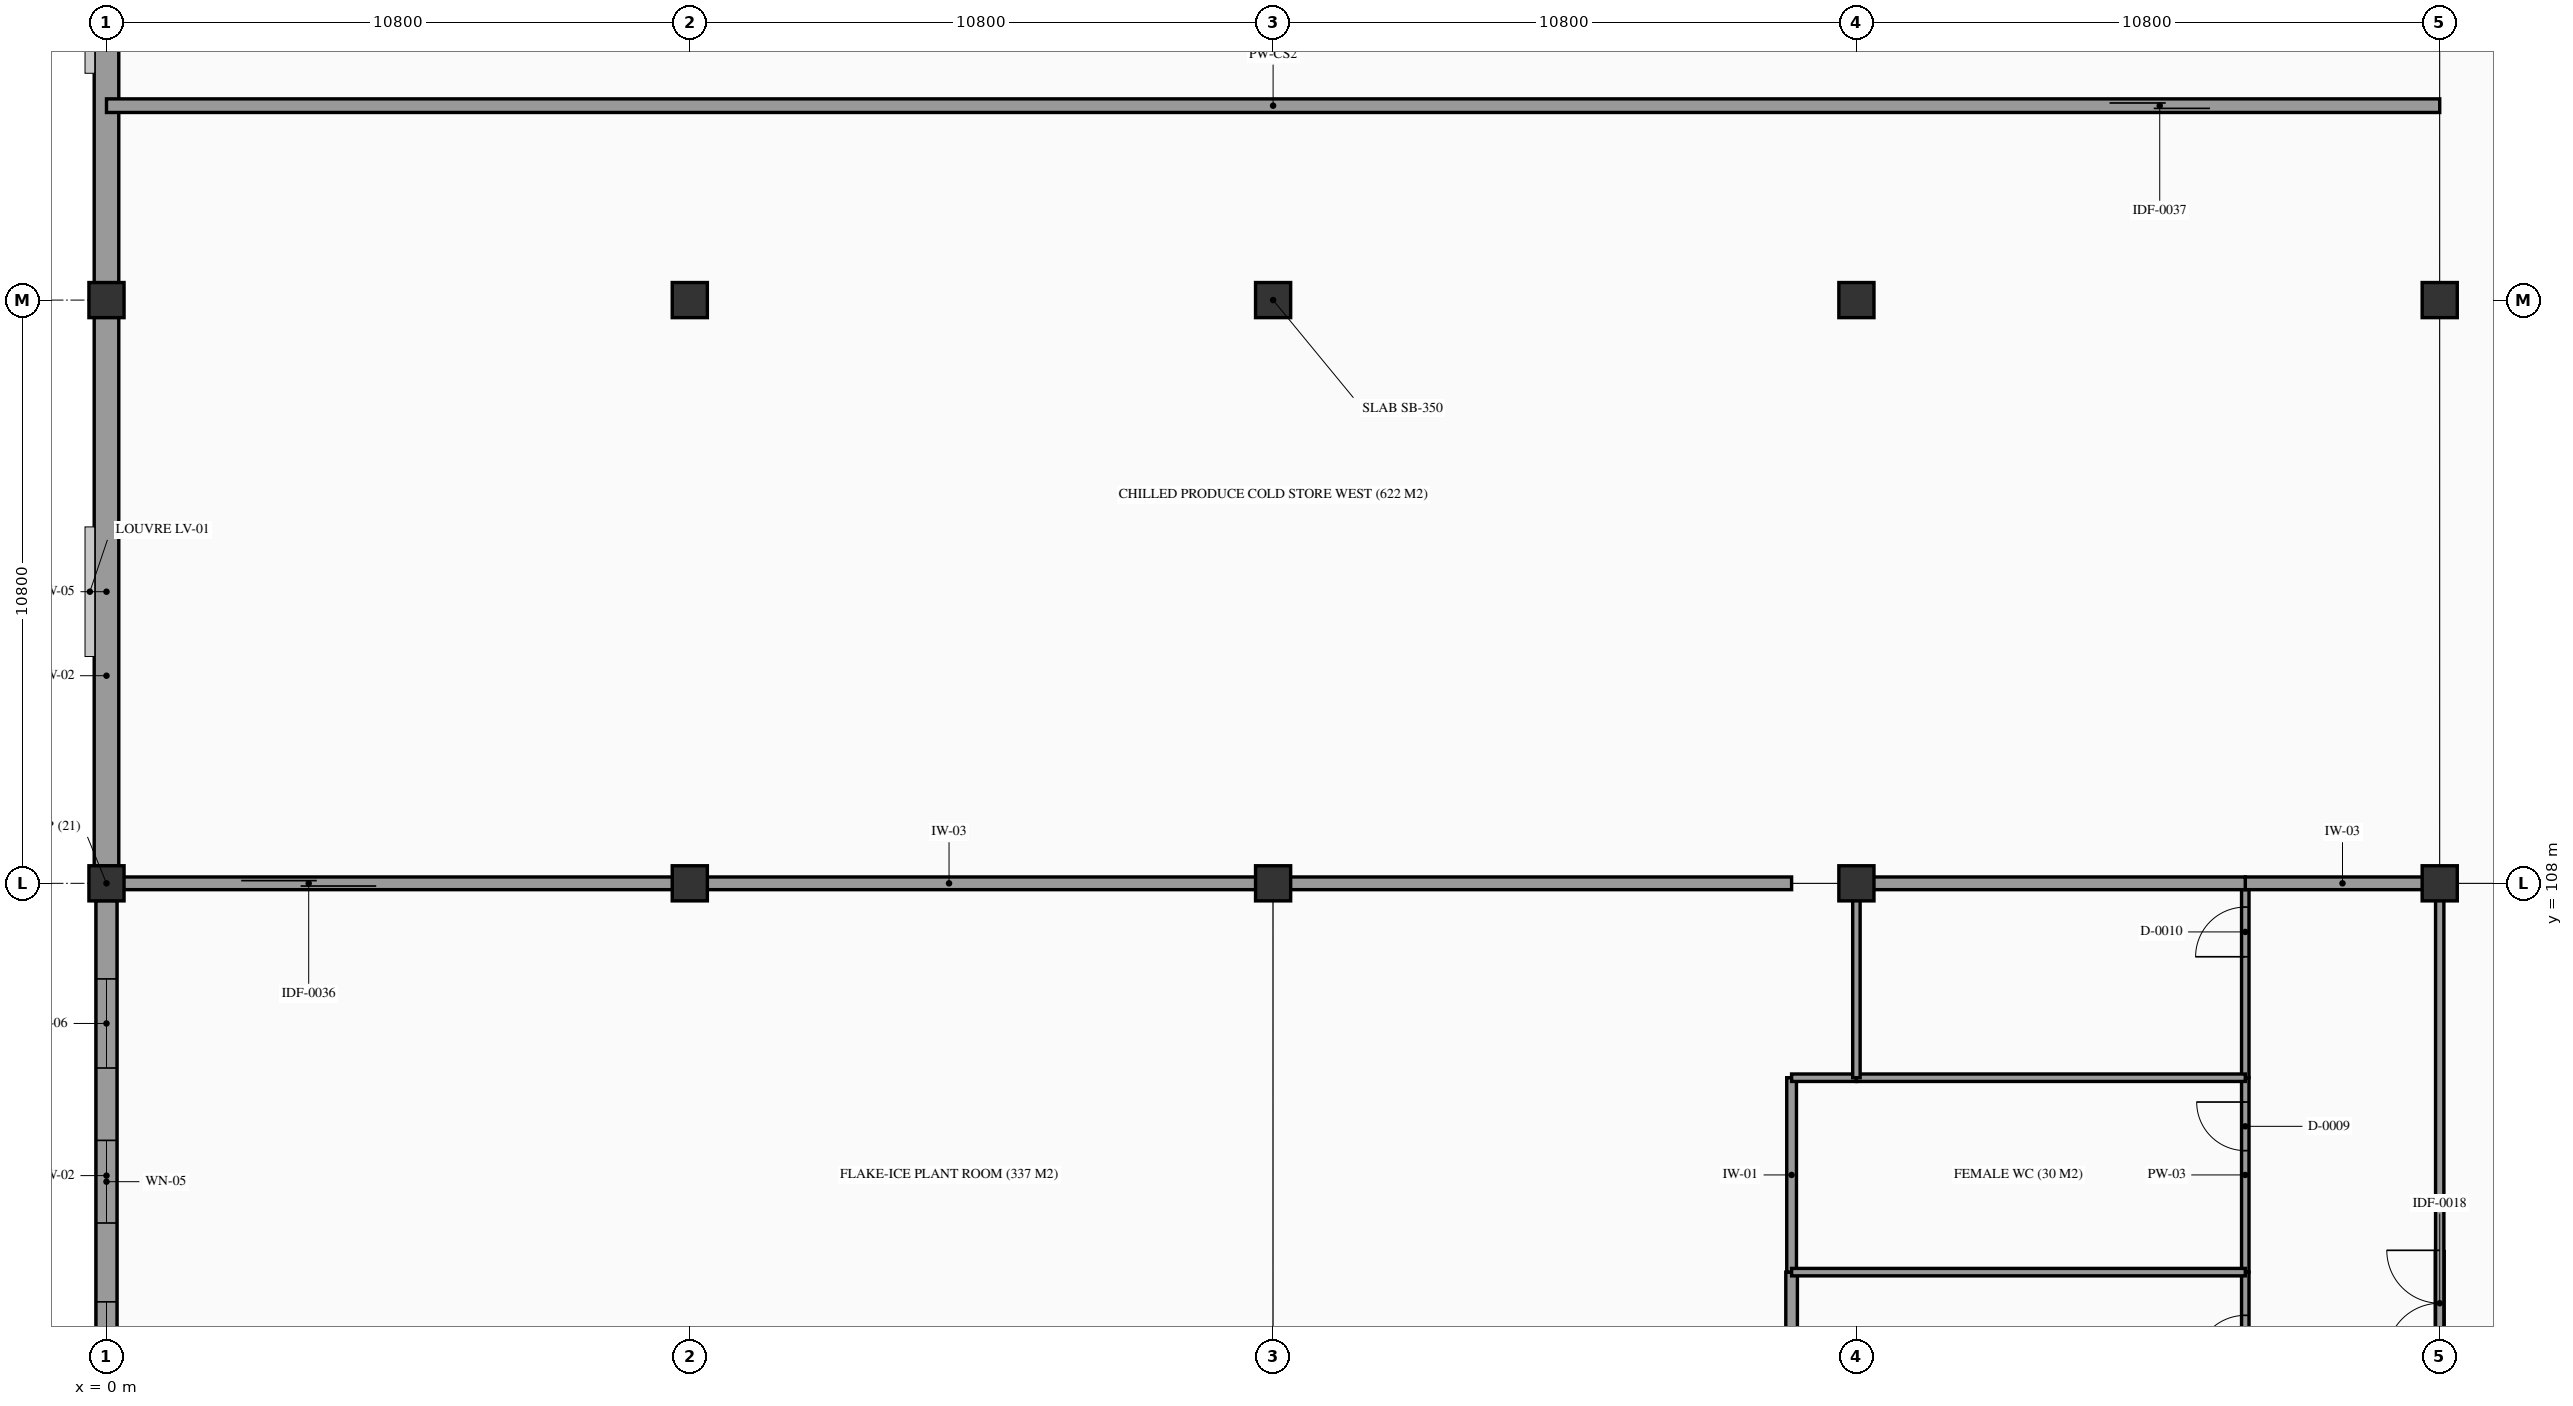
"""IFC4 building model, lengths in metres.
Left out: names, types, materials, properties, quantities, classifications, styles, units other than length and angle.
Written with IfcOpenShell. Run it as: python <this file> out.ifc"""

import sys

from ifc_helpers import new_model, si_unit, direction, frame, frame_2d, origin, origin_2d, place, context, subcontext, project, spatial, rectangle, extrude, element, fill, save


model = new_model("IFC4")
c1 = context("Model", 3, precision=1e-05, world=origin(), true_north=direction((0.0, 1.0)))
c2 = subcontext(c1, "Body", "Model", "MODEL_VIEW")
j1 = project(units=[si_unit("LENGTHUNIT", "METRE"), si_unit("PLANEANGLEUNIT", "RADIAN")], contexts=[c1])
p1 = place(None, origin())
s1 = spatial("IfcSite", under=j1, at=p1, CompositionType="ELEMENT")
p2 = place(p1, origin())
s2 = spatial("IfcBuilding", under=s1, at=p2, CompositionType="ELEMENT")
p3 = place(p2, origin())
s3 = spatial("IfcBuildingStorey", under=s2, at=p3, CompositionType="ELEMENT", Elevation=0.0)
for number, where, z_axis, x_axis in (
    (1, (0.0, 108.0, -1.2), (0.0, 0.0, 1.0), (1.0, 0.0, 0.0)),
    (2, (0.0, 118.8, -1.2), (0.0, 0.0, 1.0), (1.0, 0.0, 0.0)),
    (3, (10.8, 108.0, -1.2), (0.0, 0.0, 1.0), (1.0, 0.0, 0.0)),
    (4, (10.8, 118.8, -1.2), (0.0, 0.0, 1.0), (1.0, 0.0, 0.0)),
    (5, (21.6, 108.0, -1.2), (0.0, 0.0, 1.0), (1.0, 0.0, 0.0)),
    (6, (21.6, 118.8, -1.2), (0.0, 0.0, 1.0), (1.0, 0.0, 0.0)),
    (7, (32.4, 108.0, -1.2), (0.0, 0.0, 1.0), (1.0, 0.0, 0.0)),
    (8, (32.4, 118.8, -1.2), (0.0, 0.0, 1.0), (1.0, 0.0, 0.0)),
    (9, (43.2, 108.0, -1.2), (0.0, 0.0, 1.0), (1.0, 0.0, 0.0)),
    (10, (43.2, 118.8, -1.2), (0.0, 0.0, 1.0), (1.0, 0.0, 0.0)),
):
    element("IfcColumn", number, at=place(p3, frame(where, z_axis=z_axis, x_axis=x_axis)), inside=s3, PredefinedType="COLUMN", context=c2, shape_type="SweptSolid", body=[
        extrude(rectangle(XDim=0.65, YDim=0.65, at=origin_2d()), origin(), (0.0, 0.0, 1.0), 6.6),
    ])
p4 = place(p3, frame((0.0, 0.45, -1.2), z_axis=(0.0, 0.0, 1.0), x_axis=(0.0, 1.0, 0.0)))
e11 = element("IfcWall", 11, at=p4, inside=s3, PredefinedType="USERDEFINED", context=c2, shape_type="SweptSolid", body=[
    extrude(rectangle(XDim=128.7, YDim=0.374, at=frame_2d((64.35, 0.0))), origin(), (0.0, 0.0, 1.0), 0.14),
])
p5 = place(p3, frame((0.0, 97.495, 0.0), z_axis=(0.0, 0.0, 1.0), x_axis=(0.0, 1.0, 0.0)))
e12 = element("IfcWall", 12, at=p5, inside=s3, PredefinedType="STANDARD", context=c2, shape_type="SweptSolid", body=[
    extrude(rectangle(XDim=10.185, YDim=0.39, at=frame_2d((5.092, 0.0))), origin(), (0.0, 0.0, 1.0), 4.25),
])
p6 = place(p5, frame((1.345, 0.0, 0.95)))
e13 = element("IfcOpeningElement", 13, at=p6, cuts=e12, PredefinedType="OPENING", context=c2, shape_type="SweptSolid", body=[
    extrude(rectangle(XDim=1.41, YDim=0.9, at=frame_2d((0.705, 0.45))), frame((0.0, 0.205, 0.0), z_axis=(0.0, -1.0, 0.0), x_axis=(1.0, 0.0, 0.0)), (0.0, 0.0, 1.0), 0.41),
])
p7 = place(p5, frame((4.215, 0.0, 0.95)))
e14 = element("IfcOpeningElement", 14, at=p7, cuts=e12, PredefinedType="OPENING", context=c2, shape_type="SweptSolid", body=[
    extrude(rectangle(XDim=1.53, YDim=0.9, at=frame_2d((0.765, 0.45))), frame((0.0, 0.205, 0.0), z_axis=(0.0, -1.0, 0.0), x_axis=(1.0, 0.0, 0.0)), (0.0, 0.0, 1.0), 0.41),
])
p8 = place(p5, frame((7.085, 0.0, 0.95)))
e15 = element("IfcOpeningElement", 15, at=p8, cuts=e12, PredefinedType="OPENING", context=c2, shape_type="SweptSolid", body=[
    extrude(rectangle(XDim=1.65, YDim=0.9, at=frame_2d((0.825, 0.45))), frame((0.0, 0.205, 0.0), z_axis=(0.0, -1.0, 0.0), x_axis=(1.0, 0.0, 0.0)), (0.0, 0.0, 1.0), 0.41),
])
for number, where, z_axis, x_axis in (
    (16, (0.0, 108.32, 0.0), (0.0, 0.0, 1.0), (0.0, 1.0, 0.0)),
    (17, (0.0, 119.12, 0.0), (0.0, 0.0, 1.0), (0.0, 1.0, 0.0)),
):
    element("IfcWall", number, at=place(p3, frame(where, z_axis=z_axis, x_axis=x_axis)), inside=s3, PredefinedType="STANDARD", context=c2, shape_type="SweptSolid", body=[
        extrude(rectangle(XDim=10.16, YDim=0.455, at=frame_2d((5.08, 0.0))), origin(), (0.0, 0.0, 1.0), 4.25),
    ])
p9 = place(p3, frame((39.6, 97.2, 0.0), z_axis=(0.0, 0.0, 1.0), x_axis=(0.0, 1.0, 0.0)))
e18 = element("IfcWall", 18, at=p9, inside=s3, PredefinedType="PARTITIONING", context=c2, shape_type="SweptSolid", body=[
    extrude(rectangle(XDim=3.6, YDim=0.138, at=frame_2d((1.8, 0.0))), origin(), (0.0, 0.0, 1.0), 3.95),
])
p10 = place(p9, frame((1.88, 0.0, 0.0)))
e19 = element("IfcOpeningElement", 19, at=p10, cuts=e18, PredefinedType="OPENING", context=c2, shape_type="SweptSolid", body=[
    extrude(rectangle(XDim=0.92, YDim=2.14, at=frame_2d((0.46, 1.07))), frame((0.0, 0.079, 0.0), z_axis=(0.0, -1.0, 0.0), x_axis=(1.0, 0.0, 0.0)), (0.0, 0.0, 1.0), 0.158),
])
p11 = place(p3, frame((39.6, 100.8, 0.0), z_axis=(0.0, 0.0, 1.0), x_axis=(0.0, 1.0, 0.0)))
e20 = element("IfcWall", 20, at=p11, inside=s3, PredefinedType="PARTITIONING", context=c2, shape_type="SweptSolid", body=[
    extrude(rectangle(XDim=3.6, YDim=0.138, at=frame_2d((1.8, 0.0))), origin(), (0.0, 0.0, 1.0), 3.95),
])
p12 = place(p11, frame((2.25, 0.0, 0.0)))
e21 = element("IfcOpeningElement", 21, at=p12, cuts=e20, PredefinedType="OPENING", context=c2, shape_type="SweptSolid", body=[
    extrude(rectangle(XDim=0.9, YDim=2.1, at=frame_2d((0.45, 1.05))), frame((0.0, 0.079, 0.0), z_axis=(0.0, -1.0, 0.0), x_axis=(1.0, 0.0, 0.0)), (0.0, 0.0, 1.0), 0.158),
])
p13 = place(p3, frame((39.6, 104.4, 0.0), z_axis=(0.0, 0.0, 1.0), x_axis=(0.0, 1.0, 0.0)))
e22 = element("IfcWall", 22, at=p13, inside=s3, PredefinedType="PARTITIONING", context=c2, shape_type="SweptSolid", body=[
    extrude(rectangle(XDim=3.6, YDim=0.138, at=frame_2d((1.8, 0.0))), origin(), (0.0, 0.0, 1.0), 3.95),
])
p14 = place(p13, frame((2.24, 0.0, 0.0)))
e23 = element("IfcOpeningElement", 23, at=p14, cuts=e22, PredefinedType="OPENING", context=c2, shape_type="SweptSolid", body=[
    extrude(rectangle(XDim=0.92, YDim=2.14, at=frame_2d((0.46, 1.07))), frame((0.0, 0.079, 0.0), z_axis=(0.0, -1.0, 0.0), x_axis=(1.0, 0.0, 0.0)), (0.0, 0.0, 1.0), 0.158),
])
p15 = place(p3, frame((39.6, 108.0, 0.0), z_axis=(0.0, 0.0, 1.0), x_axis=(1.0, 0.0, 0.0)))
e24 = element("IfcWall", 24, at=p15, inside=s3, PredefinedType="PARTITIONING", context=c2, shape_type="SweptSolid", body=[
    extrude(rectangle(XDim=3.6, YDim=0.235, at=frame_2d((1.8, 0.0))), origin(), (0.0, 0.0, 1.0), 3.95),
])
p16 = place(p3, frame((43.2, 64.8, 0.0), z_axis=(0.0, 0.0, 1.0), x_axis=(0.0, 1.0, 0.0)))
e25 = element("IfcWall", 25, at=p16, inside=s3, PredefinedType="PARTITIONING", context=c2, shape_type="SweptSolid", body=[
    extrude(rectangle(XDim=43.2, YDim=0.154, at=frame_2d((21.6, 0.0))), origin(), (0.0, 0.0, 1.0), 3.95),
])
p17 = place(p16, frame((34.444, 0.0, 0.0)))
e26 = element("IfcOpeningElement", 26, at=p17, cuts=e25, PredefinedType="OPENING", context=c2, shape_type="SweptSolid", body=[
    extrude(rectangle(XDim=1.96, YDim=2.3, at=frame_2d((0.98, 1.15))), frame((0.0, 0.087, 0.0), z_axis=(0.0, -1.0, 0.0), x_axis=(1.0, 0.0, 0.0)), (0.0, 0.0, 1.0), 0.174),
])
p18 = place(p3, frame((0.0, 108.0, 0.0), z_axis=(0.0, 0.0, 1.0), x_axis=(1.0, 0.0, 0.0)))
e27 = element("IfcWall", 27, at=p18, inside=s3, PredefinedType="PARTITIONING", context=c2, shape_type="SweptSolid", body=[
    extrude(rectangle(XDim=31.2, YDim=0.235, at=frame_2d((15.6, 0.0))), origin(), (0.0, 0.0, 1.0), 3.95),
])
p19 = place(p18, frame((2.494, 0.0, 0.0)))
e28 = element("IfcOpeningElement", 28, at=p19, cuts=e27, PredefinedType="OPENING", context=c2, shape_type="SweptSolid", body=[
    extrude(rectangle(XDim=2.5, YDim=2.7, at=frame_2d((1.25, 1.35))), frame((0.0, 0.127, 0.0), z_axis=(0.0, -1.0, 0.0), x_axis=(1.0, 0.0, 0.0)), (0.0, 0.0, 1.0), 0.255),
])
p20 = place(p3, frame((0.0, 122.4, 0.0), z_axis=(0.0, 0.0, 1.0), x_axis=(1.0, 0.0, 0.0)))
e29 = element("IfcWall", 29, at=p20, inside=s3, PredefinedType="PARTITIONING", context=c2, shape_type="SweptSolid", body=[
    extrude(rectangle(XDim=43.2, YDim=0.252, at=frame_2d((21.6, 0.0))), origin(), (0.0, 0.0, 1.0), 3.95),
])
p21 = place(p20, frame((37.086, 0.0, 0.0)))
e30 = element("IfcOpeningElement", 30, at=p21, cuts=e29, PredefinedType="OPENING", context=c2, shape_type="SweptSolid", body=[
    extrude(rectangle(XDim=1.86, YDim=2.5, at=frame_2d((0.93, 1.25))), frame((0.0, 0.136, 0.0), z_axis=(0.0, -1.0, 0.0), x_axis=(1.0, 0.0, 0.0)), (0.0, 0.0, 1.0), 0.272),
])
p22 = place(p3, frame((31.2, 97.2, 0.0), z_axis=(0.0, 0.0, 1.0), x_axis=(0.0, 1.0, 0.0)))
e31 = element("IfcWall", 31, at=p22, inside=s3, PredefinedType="PARTITIONING", context=c2, shape_type="SweptSolid", body=[
    extrude(rectangle(XDim=3.6, YDim=0.215, at=frame_2d((1.8, 0.0))), origin(), (0.0, 0.0, 1.0), 3.95),
])
p23 = place(p3, frame((31.2, 100.8, 0.0), z_axis=(0.0, 0.0, 1.0), x_axis=(0.0, 1.0, 0.0)))
e32 = element("IfcWall", 32, at=p23, inside=s3, PredefinedType="PARTITIONING", context=c2, shape_type="SweptSolid", body=[
    extrude(rectangle(XDim=3.6, YDim=0.18, at=frame_2d((1.8, 0.0))), origin(), (0.0, 0.0, 1.0), 3.95),
])
p24 = place(p3, frame((31.2, 100.8, 0.0), z_axis=(0.0, 0.0, 1.0), x_axis=(1.0, 0.0, 0.0)))
e33 = element("IfcWall", 33, at=p24, inside=s3, PredefinedType="PARTITIONING", context=c2, shape_type="SweptSolid", body=[
    extrude(rectangle(XDim=8.4, YDim=0.138, at=frame_2d((4.2, 0.0))), origin(), (0.0, 0.0, 1.0), 3.95),
])
p25 = place(p3, frame((31.2, 104.4, 0.0), z_axis=(0.0, 0.0, 1.0), x_axis=(1.0, 0.0, 0.0)))
e34 = element("IfcWall", 34, at=p25, inside=s3, PredefinedType="PARTITIONING", context=c2, shape_type="SweptSolid", body=[
    extrude(rectangle(XDim=1.2, YDim=0.138, at=frame_2d((0.6, 0.0))), origin(), (0.0, 0.0, 1.0), 3.95),
])
p26 = place(p3, frame((32.4, 104.4, 0.0), z_axis=(0.0, 0.0, 1.0), x_axis=(1.0, 0.0, 0.0)))
e35 = element("IfcWall", 35, at=p26, inside=s3, PredefinedType="PARTITIONING", context=c2, shape_type="SweptSolid", body=[
    extrude(rectangle(XDim=7.2, YDim=0.138, at=frame_2d((3.6, 0.0))), origin(), (0.0, 0.0, 1.0), 3.95),
])
p27 = place(p3, frame((32.4, 104.4, 0.0), z_axis=(0.0, 0.0, 1.0), x_axis=(0.0, 1.0, 0.0)))
e36 = element("IfcWall", 36, at=p27, inside=s3, PredefinedType="PARTITIONING", context=c2, shape_type="SweptSolid", body=[
    extrude(rectangle(XDim=3.6, YDim=0.138, at=frame_2d((1.8, 0.0))), origin(), (0.0, 0.0, 1.0), 3.95),
])
p28 = place(p3, frame((32.4, 108.0, 0.0), z_axis=(0.0, 0.0, 1.0), x_axis=(1.0, 0.0, 0.0)))
e37 = element("IfcWall", 37, at=p28, inside=s3, PredefinedType="PARTITIONING", context=c2, shape_type="SweptSolid", body=[
    extrude(rectangle(XDim=7.2, YDim=0.235, at=frame_2d((3.6, 0.0))), origin(), (0.0, 0.0, 1.0), 3.95),
])
p29 = place(p6, origin())
e38 = element("IfcWindow", 38, at=p29, inside=s3, PartitioningType="SINGLE_PANEL", PredefinedType="WINDOW", context=c2, shape_type="SweptSolid", body=[
    extrude(rectangle(XDim=1.41, YDim=0.9, at=frame_2d((0.705, 0.45))), frame((0.0, 0.03, 0.0), z_axis=(0.0, -1.0, 0.0), x_axis=(1.0, 0.0, 0.0)), (0.0, 0.0, 1.0), 0.06),
])
fill(e13, e38)
p30 = place(p7, origin())
e39 = element("IfcWindow", 39, at=p30, inside=s3, PartitioningType="SINGLE_PANEL", PredefinedType="WINDOW", context=c2, shape_type="SweptSolid", body=[
    extrude(rectangle(XDim=1.53, YDim=0.9, at=frame_2d((0.765, 0.45))), frame((0.0, 0.03, 0.0), z_axis=(0.0, -1.0, 0.0), x_axis=(1.0, 0.0, 0.0)), (0.0, 0.0, 1.0), 0.06),
])
fill(e14, e39)
p31 = place(p8, origin())
e40 = element("IfcWindow", 40, at=p31, inside=s3, PartitioningType="SINGLE_PANEL", PredefinedType="WINDOW", context=c2, shape_type="SweptSolid", body=[
    extrude(rectangle(XDim=1.65, YDim=0.9, at=frame_2d((0.825, 0.45))), frame((0.0, 0.03, 0.0), z_axis=(0.0, -1.0, 0.0), x_axis=(1.0, 0.0, 0.0)), (0.0, 0.0, 1.0), 0.06),
])
fill(e15, e40)
p32 = place(p10, origin())
e41 = element("IfcDoor", 41, at=p32, inside=s3, OperationType="SINGLE_SWING_LEFT", PredefinedType="DOOR", context=c2, shape_type="SweptSolid", body=[
    extrude(rectangle(XDim=0.92, YDim=2.14, at=frame_2d((0.46, 1.07))), frame((0.0, 0.025, 0.0), z_axis=(0.0, -1.0, 0.0), x_axis=(1.0, 0.0, 0.0)), (0.0, 0.0, 1.0), 0.05),
])
fill(e19, e41)
p33 = place(p12, frame((0.9, 0.0, 0.0), z_axis=(0.0, 0.0, 1.0), x_axis=(-1.0, 0.0, 0.0)))
e42 = element("IfcDoor", 42, at=p33, inside=s3, OperationType="SINGLE_SWING_RIGHT", PredefinedType="DOOR", context=c2, shape_type="SweptSolid", body=[
    extrude(rectangle(XDim=0.9, YDim=2.1, at=frame_2d((0.45, 1.05))), frame((0.0, 0.025, 0.0), z_axis=(0.0, -1.0, 0.0), x_axis=(1.0, 0.0, 0.0)), (0.0, 0.0, 1.0), 0.05),
])
fill(e21, e42)
p34 = place(p14, origin())
e43 = element("IfcDoor", 43, at=p34, inside=s3, OperationType="SINGLE_SWING_LEFT", PredefinedType="DOOR", context=c2, shape_type="SweptSolid", body=[
    extrude(rectangle(XDim=0.92, YDim=2.14, at=frame_2d((0.46, 1.07))), frame((0.0, 0.025, 0.0), z_axis=(0.0, -1.0, 0.0), x_axis=(1.0, 0.0, 0.0)), (0.0, 0.0, 1.0), 0.05),
])
fill(e23, e43)
p35 = place(p17, frame((1.96, 0.0, 0.0), z_axis=(0.0, 0.0, 1.0), x_axis=(-1.0, 0.0, 0.0)))
e44 = element("IfcDoor", 44, at=p35, inside=s3, OperationType="DOUBLE_DOOR_SINGLE_SWING", PredefinedType="DOOR", context=c2, shape_type="SweptSolid", body=[
    extrude(rectangle(XDim=1.96, YDim=2.3, at=frame_2d((0.98, 1.15))), frame((0.0, 0.025, 0.0), z_axis=(0.0, -1.0, 0.0), x_axis=(1.0, 0.0, 0.0)), (0.0, 0.0, 1.0), 0.05),
])
fill(e26, e44)
p36 = place(p19, frame((2.5, 0.0, 0.0), z_axis=(0.0, 0.0, 1.0), x_axis=(-1.0, 0.0, 0.0)))
e45 = element("IfcDoor", 45, at=p36, inside=s3, OperationType="DOUBLE_DOOR_SLIDING", PredefinedType="DOOR", context=c2, shape_type="SweptSolid", body=[
    extrude(rectangle(XDim=2.5, YDim=2.7, at=frame_2d((1.25, 1.35))), frame((0.0, 0.025, 0.0), z_axis=(0.0, -1.0, 0.0), x_axis=(1.0, 0.0, 0.0)), (0.0, 0.0, 1.0), 0.05),
])
fill(e28, e45)
p37 = place(p21, origin())
e46 = element("IfcDoor", 46, at=p37, inside=s3, OperationType="SLIDING_TO_LEFT", PredefinedType="DOOR", context=c2, shape_type="SweptSolid", body=[
    extrude(rectangle(XDim=1.86, YDim=2.5, at=frame_2d((0.93, 1.25))), frame((0.0, 0.025, 0.0), z_axis=(0.0, -1.0, 0.0), x_axis=(1.0, 0.0, 0.0)), (0.0, 0.0, 1.0), 0.05),
])
fill(e30, e46)
save(model, sys.argv[1])
